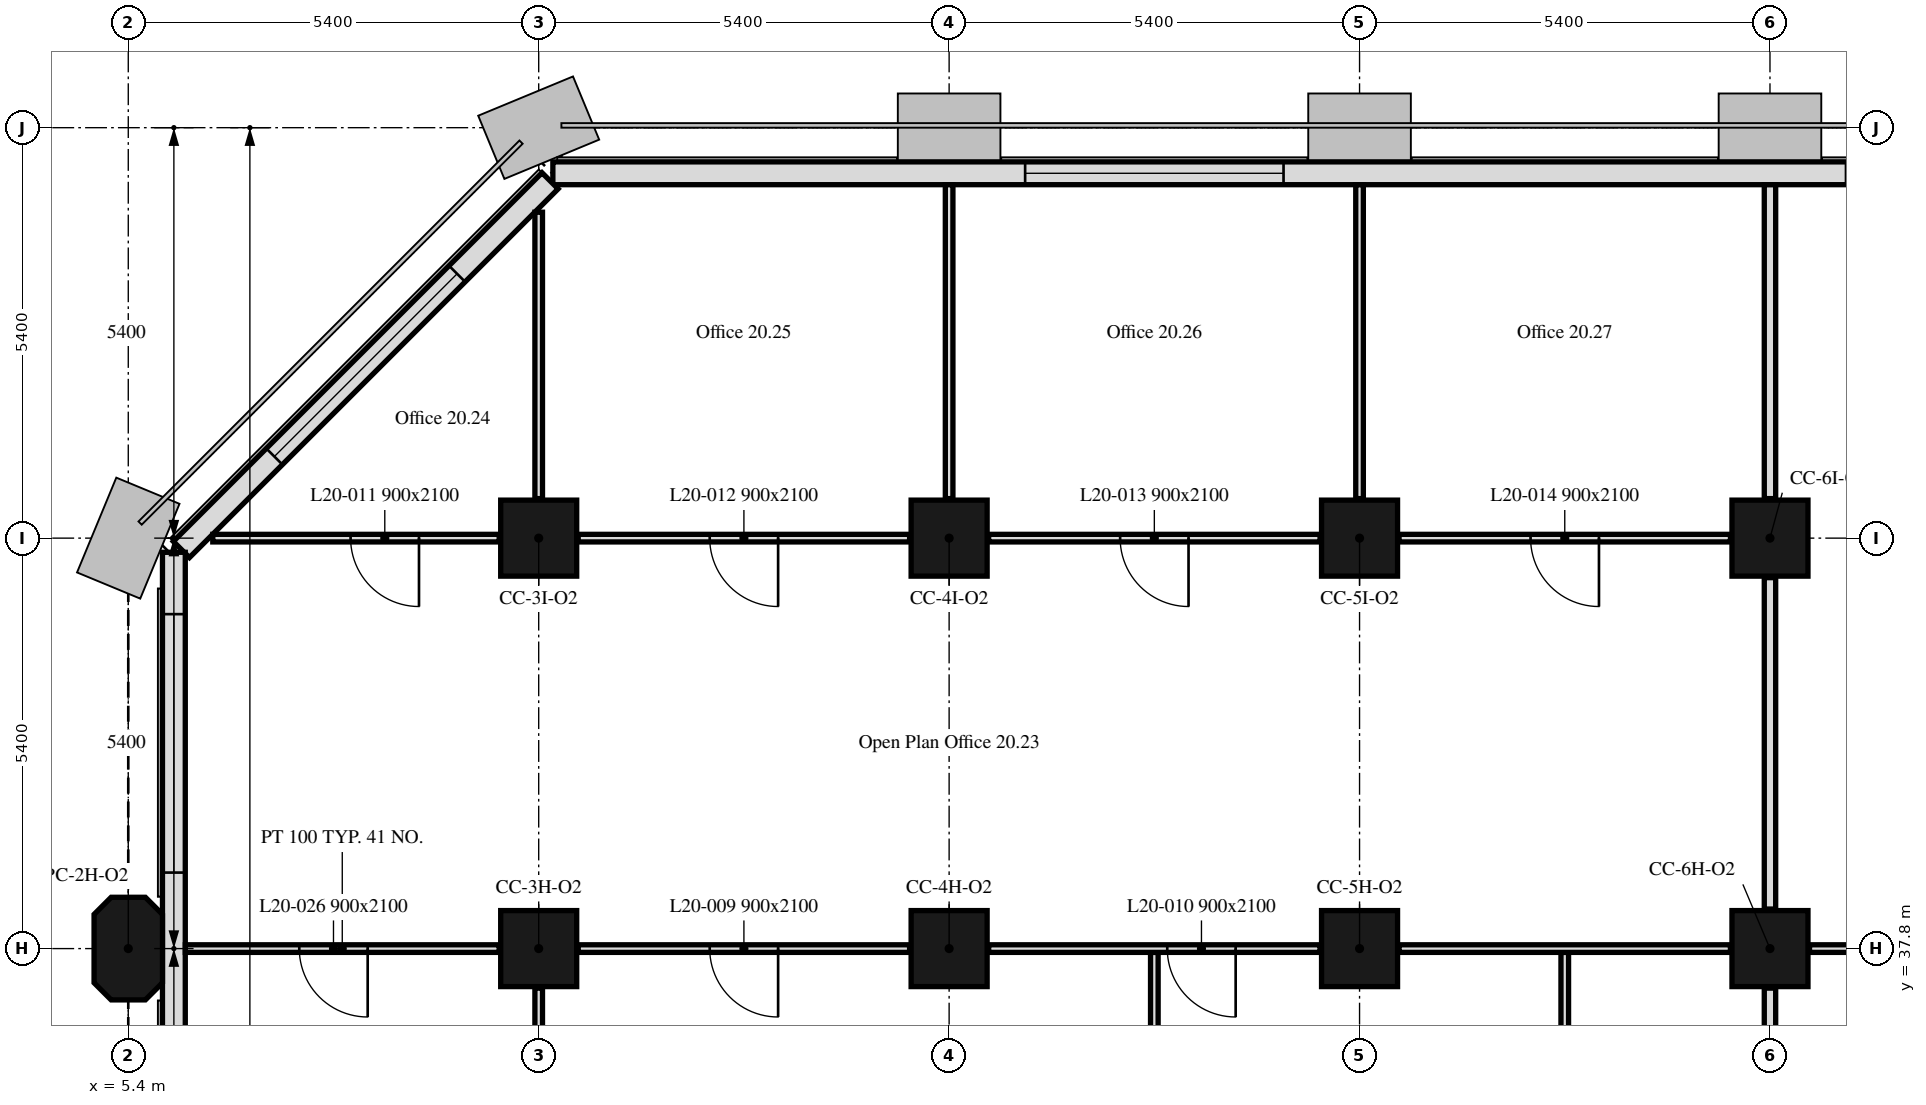
"""IFC4 building model, lengths in metres.
Left out: names, types, materials, properties, quantities, classifications, styles, units other than length and angle.
Written with IfcOpenShell. Run it as: python <this file> out.ifc"""

import sys

from ifc_helpers import new_model, si_unit, direction, frame, frame_2d, origin, origin_2d, place, context, subcontext, project, spatial, polyline, rectangle, outline, extrude, element, fill, save


model = new_model("IFC4")
c1 = context("Model", 3, precision=1e-05, world=origin(), true_north=direction((0.0, 1.0)))
c2 = subcontext(c1, "Body", "Model", "MODEL_VIEW")
j1 = project(units=[si_unit("LENGTHUNIT", "METRE"), si_unit("PLANEANGLEUNIT", "RADIAN")], contexts=[c1])
p1 = place(None, origin())
s1 = spatial("IfcSite", under=j1, at=p1, CompositionType="ELEMENT")
p2 = place(p1, origin())
s2 = spatial("IfcBuilding", under=s1, at=p2, CompositionType="ELEMENT")
p3 = place(p2, frame((0.0, 0.0, 87.8)))
s3 = spatial("IfcBuildingStorey", under=s2, at=p3, CompositionType="ELEMENT", Elevation=87.8)
p4 = place(p3, frame((5.4, 37.8, 0.0), z_axis=(0.0, 0.0, 1.0), x_axis=(0.0, 1.0, 0.0)))
e1 = element("IfcColumn", 1, at=p4, inside=s3, PredefinedType="COLUMN", context=c2, shape_type="SweptSolid", body=[
    extrude(outline(polyline([(-0.45, -0.45), (0.45, -0.45), (0.675, -0.225), (0.675, 0.225), (0.45, 0.45), (-0.45, 0.45), (-0.675, 0.225), (-0.675, -0.225), (-0.45, -0.45)])), origin(), (0.0, 0.0, 1.0), 3.5),
])
for number, where, z_axis, x_axis in (
    (2, (10.8, 37.8, 0.0), (0.0, 0.0, 1.0), (1.0, 0.0, 0.0)),
    (3, (16.2, 37.8, 0.0), (0.0, 0.0, 1.0), (1.0, 0.0, 0.0)),
    (4, (21.6, 37.8, 0.0), (0.0, 0.0, 1.0), (1.0, 0.0, 0.0)),
    (5, (27.0, 37.8, 0.0), (0.0, 0.0, 1.0), (1.0, 0.0, 0.0)),
    (6, (10.8, 43.2, 0.0), (0.0, 0.0, 1.0), (1.0, 0.0, 0.0)),
    (7, (16.2, 43.2, 0.0), (0.0, 0.0, 1.0), (1.0, 0.0, 0.0)),
    (8, (21.6, 43.2, 0.0), (0.0, 0.0, 1.0), (1.0, 0.0, 0.0)),
    (9, (27.0, 43.2, 0.0), (0.0, 0.0, 1.0), (1.0, 0.0, 0.0)),
):
    element("IfcColumn", number, at=place(p3, frame(where, z_axis=z_axis, x_axis=x_axis)), inside=s3, PredefinedType="COLUMN", context=c2, shape_type="SweptSolid", body=[
        extrude(rectangle(XDim=1.0, YDim=1.0, at=origin_2d()), origin(), (0.0, 0.0, 1.0), 3.5),
    ])
p5 = place(p3, frame((43.014, 48.0, 0.0), z_axis=(0.0, 0.0, 1.0), x_axis=(-1.0, 0.0, 0.0)))
e10 = element("IfcWall", 10, at=p5, inside=s3, PredefinedType="SOLIDWALL", context=c2, shape_type="SweptSolid", body=[
    extrude(rectangle(XDim=32.027, YDim=0.3, at=frame_2d((16.014, 0.0))), origin(), (0.0, 0.0, 1.0), 3.5),
])
p6 = place(p5, frame((0.814, 0.0, 0.9)))
e11 = element("IfcOpeningElement", 11, at=p6, cuts=e10, PredefinedType="OPENING", context=c2, shape_type="SweptSolid", body=[
    extrude(rectangle(XDim=3.4, YDim=1.7, at=frame_2d((1.7, 0.85))), frame((0.0, 0.16, 0.0), z_axis=(0.0, -1.0, 0.0), x_axis=(1.0, 0.0, 0.0)), (0.0, 0.0, 1.0), 0.32),
])
p7 = place(p5, frame((11.614, 0.0, 0.9)))
e12 = element("IfcOpeningElement", 12, at=p7, cuts=e10, PredefinedType="OPENING", context=c2, shape_type="SweptSolid", body=[
    extrude(rectangle(XDim=3.4, YDim=1.7, at=frame_2d((1.7, 0.85))), frame((0.0, 0.16, 0.0), z_axis=(0.0, -1.0, 0.0), x_axis=(1.0, 0.0, 0.0)), (0.0, 0.0, 1.0), 0.32),
])
p8 = place(p5, frame((22.414, 0.0, 0.9)))
e13 = element("IfcOpeningElement", 13, at=p8, cuts=e10, PredefinedType="OPENING", context=c2, shape_type="SweptSolid", body=[
    extrude(rectangle(XDim=3.4, YDim=1.7, at=frame_2d((1.7, 0.85))), frame((0.0, 0.16, 0.0), z_axis=(0.0, -1.0, 0.0), x_axis=(1.0, 0.0, 0.0)), (0.0, 0.0, 1.0), 0.32),
])
p9 = place(p3, frame((10.949, 47.901, 0.0), z_axis=(0.0, 0.0, 1.0), x_axis=(-0.707106781187, -0.707106781187, 0.0)))
e14 = element("IfcWall", 14, at=p9, inside=s3, PredefinedType="SOLIDWALL", context=c2, shape_type="SweptSolid", body=[
    extrude(rectangle(XDim=6.86, YDim=0.3, at=frame_2d((3.43, 0.0))), origin(), (0.0, 0.0, 1.0), 3.5),
])
p10 = place(p9, frame((1.73, 0.0, 0.9)))
e15 = element("IfcOpeningElement", 15, at=p10, cuts=e14, PredefinedType="OPENING", context=c2, shape_type="SweptSolid", body=[
    extrude(rectangle(XDim=3.4, YDim=1.7, at=frame_2d((1.7, 0.85))), frame((0.0, 0.16, 0.0), z_axis=(0.0, -1.0, 0.0), x_axis=(1.0, 0.0, 0.0)), (0.0, 0.0, 1.0), 0.32),
])
p11 = place(p3, frame((6.0, 43.014, 0.0), z_axis=(0.0, 0.0, 1.0), x_axis=(0.0, -1.0, 0.0)))
e16 = element("IfcWall", 16, at=p11, inside=s3, PredefinedType="SOLIDWALL", context=c2, shape_type="SweptSolid", body=[
    extrude(rectangle(XDim=10.614, YDim=0.3, at=frame_2d((5.307, 0.0))), origin(), (0.0, 0.0, 1.0), 3.5),
])
p12 = place(p11, frame((0.814, 0.0, 0.9)))
e17 = element("IfcOpeningElement", 17, at=p12, cuts=e16, PredefinedType="OPENING", context=c2, shape_type="SweptSolid", body=[
    extrude(rectangle(XDim=3.4, YDim=1.7, at=frame_2d((1.7, 0.85))), frame((0.0, 0.16, 0.0), z_axis=(0.0, -1.0, 0.0), x_axis=(1.0, 0.0, 0.0)), (0.0, 0.0, 1.0), 0.32),
])
p13 = place(p3, frame((10.28, 37.8, 0.0), z_axis=(0.0, 0.0, 1.0), x_axis=(-1.0, 0.0, 0.0)))
e18 = element("IfcWall", 18, at=p13, inside=s3, PredefinedType="PARTITIONING", context=c2, shape_type="SweptSolid", body=[
    extrude(rectangle(XDim=4.129, YDim=0.1, at=frame_2d((2.064, 0.0))), origin(), (0.0, 0.0, 1.0), 3.5),
])
p14 = place(p13, frame((1.73, 0.0, 0.0)))
e19 = element("IfcOpeningElement", 19, at=p14, cuts=e18, PredefinedType="OPENING", context=c2, shape_type="SweptSolid", body=[
    extrude(rectangle(XDim=0.9, YDim=2.1, at=frame_2d((0.45, 1.05))), frame((0.0, 0.05, 0.0), z_axis=(0.0, -1.0, 0.0), x_axis=(1.0, 0.0, 0.0)), (0.0, 0.0, 1.0), 0.1),
])
p15 = place(p3, frame((10.8, 35.175, 0.0), z_axis=(0.0, 0.0, 1.0), x_axis=(0.0, 1.0, 0.0)))
e20 = element("IfcWall", 20, at=p15, inside=s3, PredefinedType="PARTITIONING", context=c2, shape_type="SweptSolid", body=[
    extrude(rectangle(XDim=2.105, YDim=0.1, at=frame_2d((1.052, 0.0))), origin(), (0.0, 0.0, 1.0), 3.5),
])
p16 = place(p3, frame((18.9, 35.175, 0.0), z_axis=(0.0, 0.0, 1.0), x_axis=(0.0, 1.0, 0.0)))
e21 = element("IfcWall", 21, at=p16, inside=s3, PredefinedType="PARTITIONING", context=c2, shape_type="SweptSolid", body=[
    extrude(rectangle(XDim=2.575, YDim=0.1, at=frame_2d((1.288, 0.0))), origin(), (0.0, 0.0, 1.0), 3.5),
])
p17 = place(p3, frame((15.68, 37.8, 0.0), z_axis=(0.0, 0.0, 1.0), x_axis=(-1.0, 0.0, 0.0)))
e22 = element("IfcWall", 22, at=p17, inside=s3, PredefinedType="PARTITIONING", context=c2, shape_type="SweptSolid", body=[
    extrude(rectangle(XDim=4.36, YDim=0.1, at=frame_2d((2.18, 0.0))), origin(), (0.0, 0.0, 1.0), 3.5),
])
p18 = place(p17, frame((1.73, 0.0, 0.0)))
e23 = element("IfcOpeningElement", 23, at=p18, cuts=e22, PredefinedType="OPENING", context=c2, shape_type="SweptSolid", body=[
    extrude(rectangle(XDim=0.9, YDim=2.1, at=frame_2d((0.45, 1.05))), frame((0.0, 0.05, 0.0), z_axis=(0.0, -1.0, 0.0), x_axis=(1.0, 0.0, 0.0)), (0.0, 0.0, 1.0), 0.1),
])
p19 = place(p3, frame((24.3, 35.175, 0.0), z_axis=(0.0, 0.0, 1.0), x_axis=(0.0, 1.0, 0.0)))
e24 = element("IfcWall", 24, at=p19, inside=s3, PredefinedType="PARTITIONING", context=c2, shape_type="SweptSolid", body=[
    extrude(rectangle(XDim=2.575, YDim=0.1, at=frame_2d((1.288, 0.0))), origin(), (0.0, 0.0, 1.0), 3.5),
])
p20 = place(p3, frame((21.08, 37.8, 0.0), z_axis=(0.0, 0.0, 1.0), x_axis=(-1.0, 0.0, 0.0)))
e25 = element("IfcWall", 25, at=p20, inside=s3, PredefinedType="PARTITIONING", context=c2, shape_type="SweptSolid", body=[
    extrude(rectangle(XDim=4.36, YDim=0.1, at=frame_2d((2.18, 0.0))), origin(), (0.0, 0.0, 1.0), 3.5),
])
p21 = place(p20, frame((1.11, 0.0, 0.0)))
e26 = element("IfcOpeningElement", 26, at=p21, cuts=e25, PredefinedType="OPENING", context=c2, shape_type="SweptSolid", body=[
    extrude(rectangle(XDim=0.9, YDim=2.1, at=frame_2d((0.45, 1.05))), frame((0.0, 0.05, 0.0), z_axis=(0.0, -1.0, 0.0), x_axis=(1.0, 0.0, 0.0)), (0.0, 0.0, 1.0), 0.1),
])
p22 = place(p3, frame((27.0, 35.175, 0.0), z_axis=(0.0, 0.0, 1.0), x_axis=(0.0, 1.0, 0.0)))
e27 = element("IfcWall", 27, at=p22, inside=s3, PredefinedType="PARTITIONING", context=c2, shape_type="SweptSolid", body=[
    extrude(rectangle(XDim=2.105, YDim=0.15, at=frame_2d((1.052, 0.0))), origin(), (0.0, 0.0, 1.0), 2.75),
])
p23 = place(p3, frame((26.48, 37.8, 0.0), z_axis=(0.0, 0.0, 1.0), x_axis=(-1.0, 0.0, 0.0)))
e28 = element("IfcWall", 28, at=p23, inside=s3, PredefinedType="PARTITIONING", context=c2, shape_type="SweptSolid", body=[
    extrude(rectangle(XDim=4.36, YDim=0.1, at=frame_2d((2.18, 0.0))), origin(), (0.0, 0.0, 1.0), 3.5),
])
p24 = place(p3, frame((26.48, 43.2, 0.0), z_axis=(0.0, 0.0, 1.0), x_axis=(-1.0, 0.0, 0.0)))
e29 = element("IfcWall", 29, at=p24, inside=s3, PredefinedType="PARTITIONING", context=c2, shape_type="SweptSolid", body=[
    extrude(rectangle(XDim=4.36, YDim=0.1, at=frame_2d((2.18, 0.0))), origin(), (0.0, 0.0, 1.0), 3.5),
])
p25 = place(p24, frame((1.73, 0.0, 0.0)))
e30 = element("IfcOpeningElement", 30, at=p25, cuts=e29, PredefinedType="OPENING", context=c2, shape_type="SweptSolid", body=[
    extrude(rectangle(XDim=0.9, YDim=2.1, at=frame_2d((0.45, 1.05))), frame((0.0, 0.05, 0.0), z_axis=(0.0, -1.0, 0.0), x_axis=(1.0, 0.0, 0.0)), (0.0, 0.0, 1.0), 0.1),
])
p26 = place(p3, frame((21.08, 43.2, 0.0), z_axis=(0.0, 0.0, 1.0), x_axis=(-1.0, 0.0, 0.0)))
e31 = element("IfcWall", 31, at=p26, inside=s3, PredefinedType="PARTITIONING", context=c2, shape_type="SweptSolid", body=[
    extrude(rectangle(XDim=4.36, YDim=0.1, at=frame_2d((2.18, 0.0))), origin(), (0.0, 0.0, 1.0), 3.5),
])
p27 = place(p26, frame((1.73, 0.0, 0.0)))
e32 = element("IfcOpeningElement", 32, at=p27, cuts=e31, PredefinedType="OPENING", context=c2, shape_type="SweptSolid", body=[
    extrude(rectangle(XDim=0.9, YDim=2.1, at=frame_2d((0.45, 1.05))), frame((0.0, 0.05, 0.0), z_axis=(0.0, -1.0, 0.0), x_axis=(1.0, 0.0, 0.0)), (0.0, 0.0, 1.0), 0.1),
])
p28 = place(p3, frame((15.68, 43.2, 0.0), z_axis=(0.0, 0.0, 1.0), x_axis=(-1.0, 0.0, 0.0)))
e33 = element("IfcWall", 33, at=p28, inside=s3, PredefinedType="PARTITIONING", context=c2, shape_type="SweptSolid", body=[
    extrude(rectangle(XDim=4.36, YDim=0.1, at=frame_2d((2.18, 0.0))), origin(), (0.0, 0.0, 1.0), 3.5),
])
p29 = place(p28, frame((1.73, 0.0, 0.0)))
e34 = element("IfcOpeningElement", 34, at=p29, cuts=e33, PredefinedType="OPENING", context=c2, shape_type="SweptSolid", body=[
    extrude(rectangle(XDim=0.9, YDim=2.1, at=frame_2d((0.45, 1.05))), frame((0.0, 0.05, 0.0), z_axis=(0.0, -1.0, 0.0), x_axis=(1.0, 0.0, 0.0)), (0.0, 0.0, 1.0), 0.1),
])
p30 = place(p3, frame((10.28, 43.2, 0.0), z_axis=(0.0, 0.0, 1.0), x_axis=(-1.0, 0.0, 0.0)))
e35 = element("IfcWall", 35, at=p30, inside=s3, PredefinedType="PARTITIONING", context=c2, shape_type="SweptSolid", body=[
    extrude(rectangle(XDim=3.768, YDim=0.1, at=frame_2d((1.884, 0.0))), origin(), (0.0, 0.0, 1.0), 3.5),
])
p31 = place(p30, frame((1.055, 0.0, 0.0)))
e36 = element("IfcOpeningElement", 36, at=p31, cuts=e35, PredefinedType="OPENING", context=c2, shape_type="SweptSolid", body=[
    extrude(rectangle(XDim=0.9, YDim=2.1, at=frame_2d((0.45, 1.05))), frame((0.0, 0.05, 0.0), z_axis=(0.0, -1.0, 0.0), x_axis=(1.0, 0.0, 0.0)), (0.0, 0.0, 1.0), 0.1),
])
p32 = place(p3, frame((27.0, 38.32, 0.0), z_axis=(0.0, 0.0, 1.0), x_axis=(0.0, 1.0, 0.0)))
e37 = element("IfcWall", 37, at=p32, inside=s3, PredefinedType="PARTITIONING", context=c2, shape_type="SweptSolid", body=[
    extrude(rectangle(XDim=4.36, YDim=0.15, at=frame_2d((2.18, 0.0))), origin(), (0.0, 0.0, 1.0), 2.75),
])
p33 = place(p3, frame((10.8, 43.72, 0.0), z_axis=(0.0, 0.0, 1.0), x_axis=(0.0, 1.0, 0.0)))
e38 = element("IfcWall", 38, at=p33, inside=s3, PredefinedType="PARTITIONING", context=c2, shape_type="SweptSolid", body=[
    extrude(rectangle(XDim=3.768, YDim=0.1, at=frame_2d((1.884, 0.0))), origin(), (0.0, 0.0, 1.0), 3.5),
])
for number, where, z_axis, x_axis in (
    (39, (16.2, 43.72, 0.0), (0.0, 0.0, 1.0), (0.0, 1.0, 0.0)),
    (40, (21.6, 43.72, 0.0), (0.0, 0.0, 1.0), (0.0, 1.0, 0.0)),
):
    element("IfcWall", number, at=place(p3, frame(where, z_axis=z_axis, x_axis=x_axis)), inside=s3, PredefinedType="PARTITIONING", context=c2, shape_type="SweptSolid", body=[
        extrude(rectangle(XDim=4.129, YDim=0.1, at=frame_2d((2.064, 0.0))), origin(), (0.0, 0.0, 1.0), 2.75),
    ])
p34 = place(p3, frame((27.0, 43.72, 0.0), z_axis=(0.0, 0.0, 1.0), x_axis=(0.0, 1.0, 0.0)))
e41 = element("IfcWall", 41, at=p34, inside=s3, PredefinedType="PARTITIONING", context=c2, shape_type="SweptSolid", body=[
    extrude(rectangle(XDim=4.129, YDim=0.15, at=frame_2d((2.064, 0.0))), origin(), (0.0, 0.0, 1.0), 2.75),
])
p35 = place(p3, frame((31.88, 37.8, 0.0), z_axis=(0.0, 0.0, 1.0), x_axis=(-1.0, 0.0, 0.0)))
e42 = element("IfcWall", 42, at=p35, inside=s3, PredefinedType="PARTITIONING", context=c2, shape_type="SweptSolid", body=[
    extrude(rectangle(XDim=4.36, YDim=0.1, at=frame_2d((2.18, 0.0))), origin(), (0.0, 0.0, 1.0), 3.5),
])
p36 = place(p35, frame((1.73, 0.0, 0.0)))
e43 = element("IfcOpeningElement", 43, at=p36, cuts=e42, PredefinedType="OPENING", context=c2, shape_type="SweptSolid", body=[
    extrude(rectangle(XDim=0.9, YDim=2.1, at=frame_2d((0.45, 1.05))), frame((0.0, 0.05, 0.0), z_axis=(0.0, -1.0, 0.0), x_axis=(1.0, 0.0, 0.0)), (0.0, 0.0, 1.0), 0.1),
])
p37 = place(p8, origin())
e44 = element("IfcWindow", 44, at=p37, inside=s3, PartitioningType="SINGLE_PANEL", PredefinedType="WINDOW", context=c2, shape_type="SweptSolid", body=[
    extrude(rectangle(XDim=3.4, YDim=1.7, at=frame_2d((1.7, 0.85))), frame((0.0, 0.03, 0.0), z_axis=(0.0, -1.0, 0.0), x_axis=(1.0, 0.0, 0.0)), (0.0, 0.0, 1.0), 0.06),
])
fill(e13, e44)
p38 = place(p10, origin())
e45 = element("IfcWindow", 45, at=p38, inside=s3, PartitioningType="SINGLE_PANEL", PredefinedType="WINDOW", context=c2, shape_type="SweptSolid", body=[
    extrude(rectangle(XDim=3.4, YDim=1.7, at=frame_2d((1.7, 0.85))), frame((0.0, 0.03, 0.0), z_axis=(0.0, -1.0, 0.0), x_axis=(1.0, 0.0, 0.0)), (0.0, 0.0, 1.0), 0.06),
])
fill(e15, e45)
p39 = place(p12, origin())
e46 = element("IfcWindow", 46, at=p39, inside=s3, PartitioningType="SINGLE_PANEL", PredefinedType="WINDOW", context=c2, shape_type="SweptSolid", body=[
    extrude(rectangle(XDim=3.4, YDim=1.7, at=frame_2d((1.7, 0.85))), frame((0.0, 0.03, 0.0), z_axis=(0.0, -1.0, 0.0), x_axis=(1.0, 0.0, 0.0)), (0.0, 0.0, 1.0), 0.06),
])
fill(e17, e46)
p40 = place(p18, origin())
e47 = element("IfcDoor", 47, at=p40, inside=s3, OperationType="SINGLE_SWING_RIGHT", PredefinedType="DOOR", context=c2, shape_type="SweptSolid", body=[
    extrude(rectangle(XDim=0.9, YDim=2.1, at=frame_2d((0.45, 1.05))), frame((0.0, 0.025, 0.0), z_axis=(0.0, -1.0, 0.0), x_axis=(1.0, 0.0, 0.0)), (0.0, 0.0, 1.0), 0.05),
])
fill(e23, e47)
p41 = place(p21, origin())
e48 = element("IfcDoor", 48, at=p41, inside=s3, OperationType="SINGLE_SWING_RIGHT", PredefinedType="DOOR", context=c2, shape_type="SweptSolid", body=[
    extrude(rectangle(XDim=0.9, YDim=2.1, at=frame_2d((0.45, 1.05))), frame((0.0, 0.025, 0.0), z_axis=(0.0, -1.0, 0.0), x_axis=(1.0, 0.0, 0.0)), (0.0, 0.0, 1.0), 0.05),
])
fill(e26, e48)
p42 = place(p31, origin())
e49 = element("IfcDoor", 49, at=p42, inside=s3, OperationType="SINGLE_SWING_RIGHT", PredefinedType="DOOR", context=c2, shape_type="SweptSolid", body=[
    extrude(rectangle(XDim=0.9, YDim=2.1, at=frame_2d((0.45, 1.05))), frame((0.0, 0.025, 0.0), z_axis=(0.0, -1.0, 0.0), x_axis=(1.0, 0.0, 0.0)), (0.0, 0.0, 1.0), 0.05),
])
fill(e36, e49)
p43 = place(p29, origin())
e50 = element("IfcDoor", 50, at=p43, inside=s3, OperationType="SINGLE_SWING_RIGHT", PredefinedType="DOOR", context=c2, shape_type="SweptSolid", body=[
    extrude(rectangle(XDim=0.9, YDim=2.1, at=frame_2d((0.45, 1.05))), frame((0.0, 0.025, 0.0), z_axis=(0.0, -1.0, 0.0), x_axis=(1.0, 0.0, 0.0)), (0.0, 0.0, 1.0), 0.05),
])
fill(e34, e50)
p44 = place(p27, origin())
e51 = element("IfcDoor", 51, at=p44, inside=s3, OperationType="SINGLE_SWING_RIGHT", PredefinedType="DOOR", context=c2, shape_type="SweptSolid", body=[
    extrude(rectangle(XDim=0.9, YDim=2.1, at=frame_2d((0.45, 1.05))), frame((0.0, 0.025, 0.0), z_axis=(0.0, -1.0, 0.0), x_axis=(1.0, 0.0, 0.0)), (0.0, 0.0, 1.0), 0.05),
])
fill(e32, e51)
p45 = place(p25, origin())
e52 = element("IfcDoor", 52, at=p45, inside=s3, OperationType="SINGLE_SWING_RIGHT", PredefinedType="DOOR", context=c2, shape_type="SweptSolid", body=[
    extrude(rectangle(XDim=0.9, YDim=2.1, at=frame_2d((0.45, 1.05))), frame((0.0, 0.025, 0.0), z_axis=(0.0, -1.0, 0.0), x_axis=(1.0, 0.0, 0.0)), (0.0, 0.0, 1.0), 0.05),
])
fill(e30, e52)
p46 = place(p14, origin())
e53 = element("IfcDoor", 53, at=p46, inside=s3, OperationType="SINGLE_SWING_LEFT", PredefinedType="DOOR", context=c2, shape_type="SweptSolid", body=[
    extrude(rectangle(XDim=0.9, YDim=2.1, at=frame_2d((0.45, 1.05))), frame((0.0, 0.025, 0.0), z_axis=(0.0, -1.0, 0.0), x_axis=(1.0, 0.0, 0.0)), (0.0, 0.0, 1.0), 0.05),
])
fill(e19, e53)
save(model, sys.argv[1])
